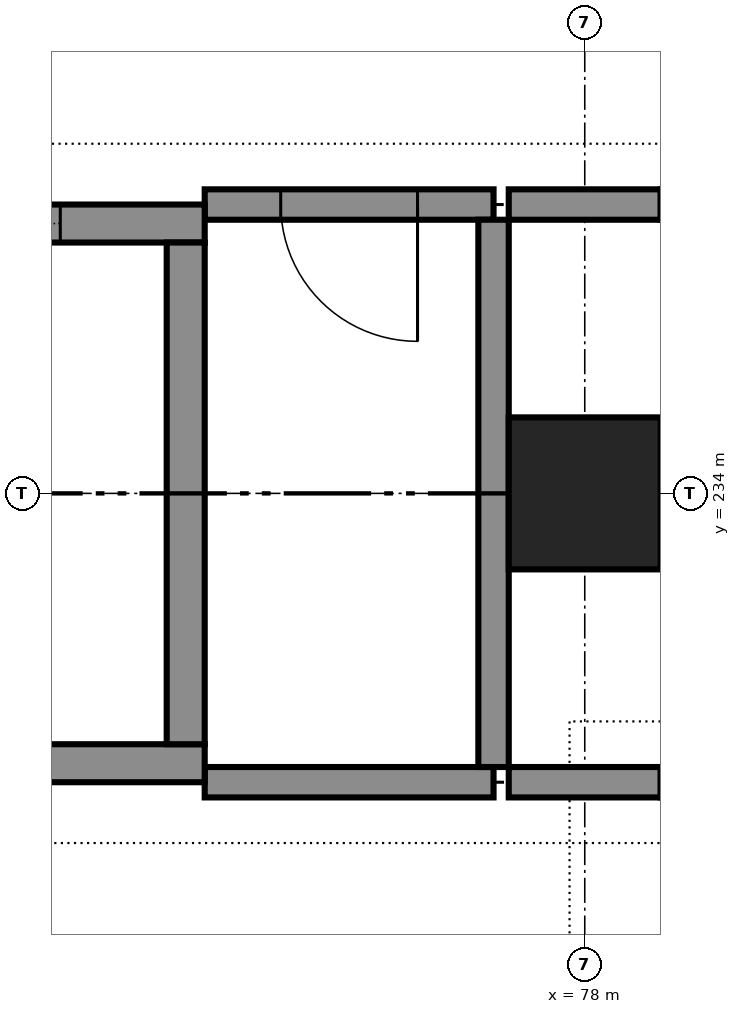
"""IFC4 building model, lengths in metres.
Left out: names, types, materials, properties, quantities, classifications, styles, units other than length and angle.
Written with IfcOpenShell. Run it as: python <this file> out.ifc"""

import sys

from ifc_helpers import new_model, si_unit, direction, frame, frame_2d, origin, origin_2d, place, context, subcontext, project, spatial, rectangle, extrude, element, fill, save


model = new_model("IFC4")
c1 = context("Model", 3, precision=1e-05, world=origin(), true_north=direction((0.0, 1.0)))
c2 = subcontext(c1, "Body", "Model", "MODEL_VIEW")
j1 = project(units=[si_unit("LENGTHUNIT", "METRE"), si_unit("PLANEANGLEUNIT", "RADIAN")], contexts=[c1])
p1 = place(None, origin())
s1 = spatial("IfcSite", under=j1, at=p1, CompositionType="ELEMENT")
p2 = place(p1, origin())
s2 = spatial("IfcBuilding", under=s1, at=p2, CompositionType="ELEMENT")
p3 = place(p2, frame((0.0, 0.0, 12.0)))
s3 = spatial("IfcBuildingStorey", under=s2, at=p3, CompositionType="ELEMENT", Elevation=12.0)
p4 = place(p3, frame((78.0, 234.0, 0.0), z_axis=(0.0, 0.0, 1.0), x_axis=(1.0, 0.0, 0.0)))
e1 = element("IfcColumn", 1, at=p4, inside=s3, PredefinedType="COLUMN", context=c2, shape_type="SweptSolid", body=[
    extrude(rectangle(XDim=1.0, YDim=1.0, at=origin_2d()), origin(), (0.0, 0.0, 1.0), 5.0),
])
p5 = place(p3, frame((72.5, 232.225, 0.0), z_axis=(0.0, 0.0, 1.0), x_axis=(1.0, 0.0, 0.0)))
e2 = element("IfcWall", 2, at=p5, inside=s3, PredefinedType="SHEAR", context=c2, shape_type="SweptSolid", body=[
    extrude(rectangle(XDim=3.0, YDim=0.25, at=frame_2d((1.5, 0.0))), origin(), (0.0, 0.0, 1.0), 5.0),
])
p6 = place(p3, frame((72.5, 235.775, 0.0), z_axis=(0.0, 0.0, 1.0), x_axis=(1.0, 0.0, 0.0)))
e3 = element("IfcWall", 3, at=p6, inside=s3, PredefinedType="SHEAR", context=c2, shape_type="SweptSolid", body=[
    extrude(rectangle(XDim=3.0, YDim=0.25, at=frame_2d((1.5, 0.0))), origin(), (0.0, 0.0, 1.0), 5.0),
])
p7 = place(p6, frame((0.95, 0.0, 0.0)))
e4 = element("IfcOpeningElement", 4, at=p7, cuts=e3, PredefinedType="OPENING", context=c2, shape_type="SweptSolid", body=[
    extrude(rectangle(XDim=1.1, YDim=2.1, at=frame_2d((0.55, 1.05))), frame((0.0, 0.135, 0.0), z_axis=(0.0, -1.0, 0.0), x_axis=(1.0, 0.0, 0.0)), (0.0, 0.0, 1.0), 0.27),
])
p8 = place(p3, frame((75.375, 232.35, 0.0), z_axis=(0.0, 0.0, 1.0), x_axis=(0.0, 1.0, 0.0)))
e5 = element("IfcWall", 5, at=p8, inside=s3, PredefinedType="SHEAR", context=c2, shape_type="SweptSolid", body=[
    extrude(rectangle(XDim=3.3, YDim=0.25, at=frame_2d((1.65, 0.0))), origin(), (0.0, 0.0, 1.0), 5.0),
])
p9 = place(p3, frame((75.5, 232.1, 0.0), z_axis=(0.0, 0.0, 1.0), x_axis=(1.0, 0.0, 0.0)))
e6 = element("IfcWall", 6, at=p9, inside=s3, PredefinedType="PARTITIONING", context=c2, shape_type="SweptSolid", body=[
    extrude(rectangle(XDim=1.9, YDim=0.2, at=frame_2d((0.95, 0.0))), origin(), (0.0, 0.0, 1.0), 4.75),
])
p10 = place(p3, frame((77.5, 232.1, 0.0), z_axis=(0.0, 0.0, 1.0), x_axis=(1.0, 0.0, 0.0)))
e7 = element("IfcWall", 7, at=p10, inside=s3, PredefinedType="PARTITIONING", context=c2, shape_type="SweptSolid", body=[
    extrude(rectangle(XDim=1.0, YDim=0.2, at=frame_2d((0.5, 0.0))), origin(), (0.0, 0.0, 1.0), 4.75),
])
p11 = place(p3, frame((77.4, 235.9, 0.0), z_axis=(0.0, 0.0, 1.0), x_axis=(-1.0, 0.0, 0.0)))
e8 = element("IfcWall", 8, at=p11, inside=s3, PredefinedType="PARTITIONING", context=c2, shape_type="SweptSolid", body=[
    extrude(rectangle(XDim=1.9, YDim=0.2, at=frame_2d((0.95, 0.0))), origin(), (0.0, 0.0, 1.0), 4.75),
])
p12 = place(p11, frame((0.5, 0.0, 0.0)))
e9 = element("IfcOpeningElement", 9, at=p12, cuts=e8, PredefinedType="OPENING", context=c2, shape_type="SweptSolid", body=[
    extrude(rectangle(XDim=0.9, YDim=2.1, at=frame_2d((0.45, 1.05))), frame((0.0, 0.11, 0.0), z_axis=(0.0, -1.0, 0.0), x_axis=(1.0, 0.0, 0.0)), (0.0, 0.0, 1.0), 0.22),
])
p13 = place(p3, frame((77.5, 235.9, 0.0), z_axis=(0.0, 0.0, 1.0), x_axis=(1.0, 0.0, 0.0)))
e10 = element("IfcWall", 10, at=p13, inside=s3, PredefinedType="PARTITIONING", context=c2, shape_type="SweptSolid", body=[
    extrude(rectangle(XDim=1.0, YDim=0.2, at=frame_2d((0.5, 0.0))), origin(), (0.0, 0.0, 1.0), 4.75),
])
p14 = place(p3, frame((77.4, 232.2, 0.0), z_axis=(0.0, 0.0, 1.0), x_axis=(0.0, 1.0, 0.0)))
e11 = element("IfcWall", 11, at=p14, inside=s3, PredefinedType="PARTITIONING", context=c2, shape_type="SweptSolid", body=[
    extrude(rectangle(XDim=3.6, YDim=0.2, at=frame_2d((1.8, 0.0))), origin(), (0.0, 0.0, 1.0), 4.75),
])
p15 = place(p12, origin())
e12 = element("IfcDoor", 12, at=p15, inside=s3, OperationType="SINGLE_SWING_LEFT", PredefinedType="DOOR", context=c2, shape_type="SweptSolid", body=[
    extrude(rectangle(XDim=0.9, YDim=2.1, at=frame_2d((0.45, 1.05))), frame((0.0, 0.025, 0.0), z_axis=(0.0, -1.0, 0.0), x_axis=(1.0, 0.0, 0.0)), (0.0, 0.0, 1.0), 0.05),
])
fill(e9, e12)
p16 = place(p7, origin())
e13 = element("IfcDoor", 13, at=p16, inside=s3, OperationType="SLIDING_TO_LEFT", PredefinedType="DOOR", context=c2, shape_type="SweptSolid", body=[
    extrude(rectangle(XDim=1.1, YDim=2.1, at=frame_2d((0.55, 1.05))), frame((0.0, 0.025, 0.0), z_axis=(0.0, -1.0, 0.0), x_axis=(1.0, 0.0, 0.0)), (0.0, 0.0, 1.0), 0.05),
])
fill(e4, e13)
save(model, sys.argv[1])
